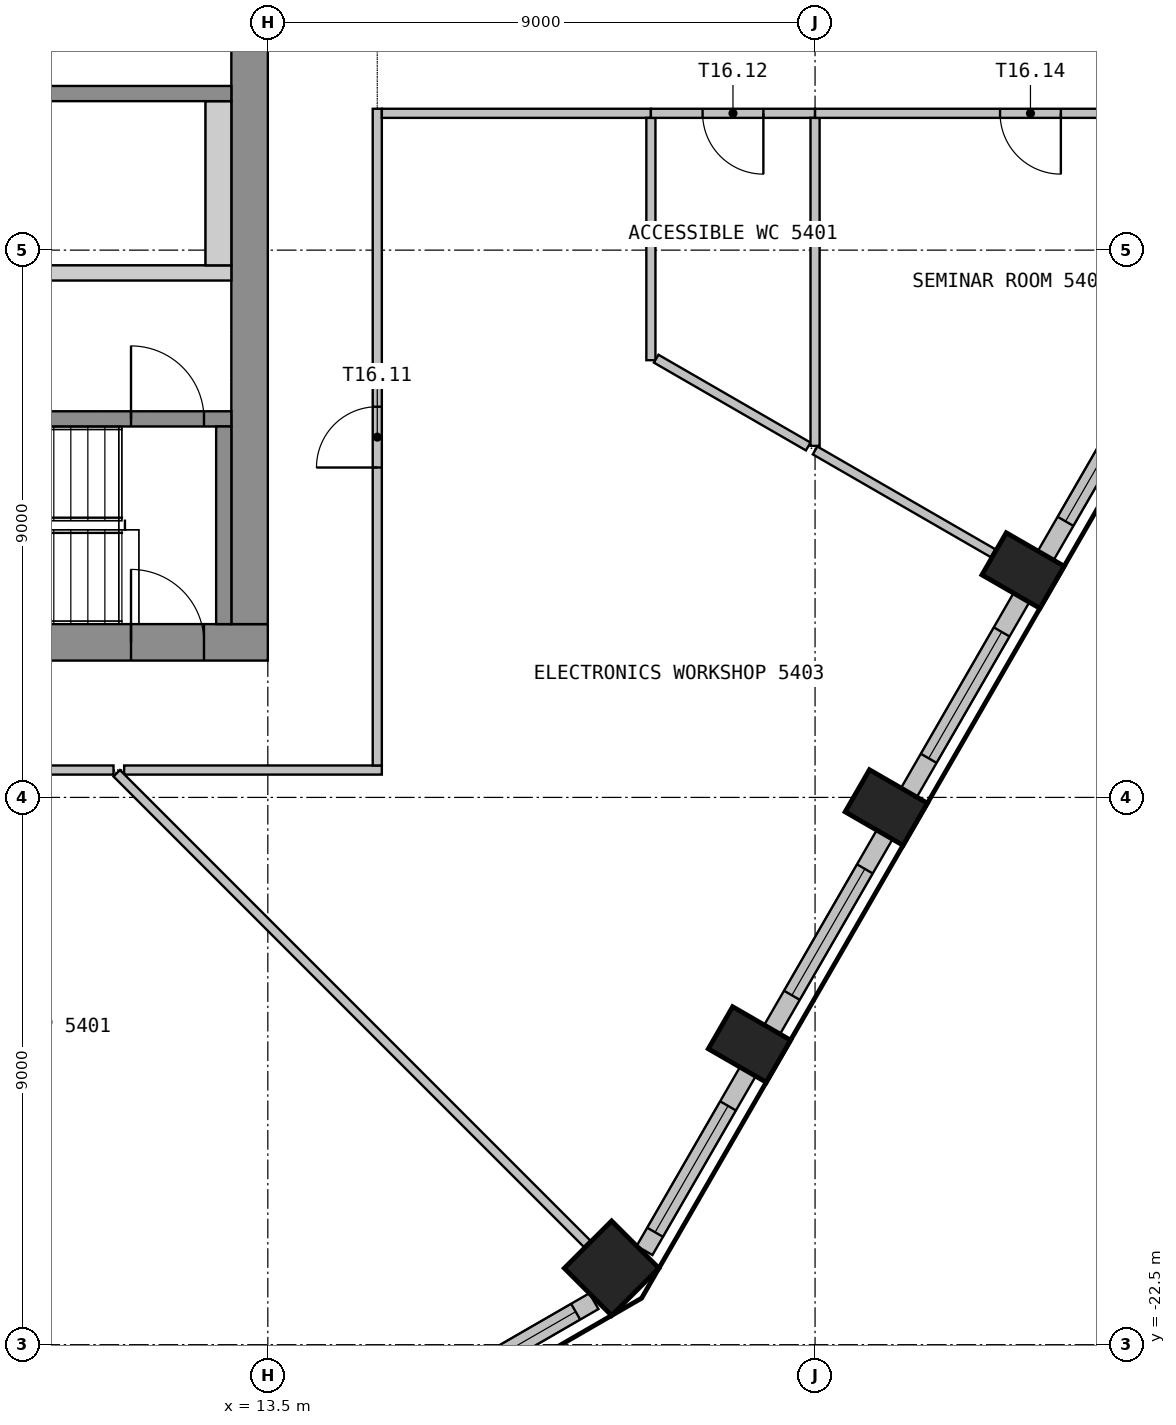
"""IFC4 building model, lengths in metres.
Left out: names, types, materials, properties, quantities, classifications, styles, units other than length and angle.
Written with IfcOpenShell. Run it as: python <this file> out.ifc"""

import sys

from ifc_helpers import new_model, si_unit, direction, frame, frame_2d, origin, origin_2d, place, context, subcontext, project, spatial, polyline, rectangle, outline, extrude, element, fill, save


model = new_model("IFC4")
c1 = context("Model", 3, precision=1e-05, world=origin(), true_north=direction((0.0, 1.0)))
c2 = subcontext(c1, "Body", "Model", "MODEL_VIEW")
j1 = project(units=[si_unit("LENGTHUNIT", "METRE"), si_unit("PLANEANGLEUNIT", "RADIAN")], contexts=[c1])
p1 = place(None, origin())
s1 = spatial("IfcSite", under=j1, at=p1, CompositionType="ELEMENT")
p2 = place(p1, origin())
s2 = spatial("IfcBuilding", under=s1, at=p2, CompositionType="ELEMENT")
p3 = place(p2, frame((0.0, 0.0, 219.0)))
s3 = spatial("IfcBuildingStorey", under=s2, at=p3, CompositionType="ELEMENT", Elevation=219.0)
p4 = place(p3, frame((19.154, -21.242, 0.0), z_axis=(0.0, 0.0, 1.0), x_axis=(0.707106781187, 0.707106781187, 0.0)))
e1 = element("IfcColumn", 1, at=p4, inside=s3, PredefinedType="COLUMN", context=c2, shape_type="SweptSolid", body=[
    extrude(rectangle(XDim=1.1, YDim=1.1, at=origin_2d()), origin(), (0.0, 0.0, 1.0), 3.55),
])
for number, where, z_axis, x_axis in (
    (2, (21.421, -17.563, 0.0), (0.0, 0.0, 1.0), (0.5, 0.866, 0.0)),
    (3, (23.671, -13.666, 0.0), (0.0, 0.0, 1.0), (0.5, 0.866, 0.0)),
    (4, (25.921, -9.769, 0.0), (0.0, 0.0, 1.0), (0.5, 0.866, 0.0)),
):
    element("IfcColumn", number, at=place(p3, frame(where, z_axis=z_axis, x_axis=x_axis)), inside=s3, PredefinedType="COLUMN", context=c2, shape_type="SweptSolid", body=[
        extrude(rectangle(XDim=0.8, YDim=1.1, at=origin_2d()), origin(), (0.0, 0.0, 1.0), 3.55),
    ])
p5 = place(p3, frame((16.184, -23.331, 0.0), z_axis=(0.0, 0.0, 1.0), x_axis=(0.865994975416, 0.500052699777, 0.0)))
e5 = element("IfcWall", 5, at=p5, inside=s3, PredefinedType="SOLIDWALL", context=c2, shape_type="SweptSolid", body=[
    extrude(rectangle(XDim=3.093, YDim=0.3, at=frame_2d((1.546, 0.0))), origin(), (0.0, 0.0, 1.0), 3.55),
])
p6 = place(p5, frame((0.346, 0.0, 0.9)))
e6 = element("IfcOpeningElement", 6, at=p6, cuts=e5, PredefinedType="OPENING", context=c2, shape_type="SweptSolid", body=[
    extrude(rectangle(XDim=2.4, YDim=2.1, at=frame_2d((1.2, 1.05))), frame((0.0, 0.16, 0.0), z_axis=(0.0, -1.0, 0.0), x_axis=(1.0, 0.0, 0.0)), (0.0, 0.0, 1.0), 0.32),
])
p7 = place(p3, frame((19.696, -20.951, 0.0), z_axis=(0.0, 0.0, 1.0), x_axis=(0.500012868213, 0.866017974191, 0.0)))
e7 = element("IfcWall", 7, at=p7, inside=s3, PredefinedType="SOLIDWALL", context=c2, shape_type="SweptSolid", body=[
    extrude(rectangle(XDim=3.396, YDim=0.3, at=frame_2d((1.698, 0.0))), origin(), (0.0, 0.0, 1.0), 3.55),
])
p8 = place(p7, frame((0.346, 0.0, 0.9)))
e8 = element("IfcOpeningElement", 8, at=p8, cuts=e7, PredefinedType="OPENING", context=c2, shape_type="SweptSolid", body=[
    extrude(rectangle(XDim=2.4, YDim=2.1, at=frame_2d((1.2, 1.05))), frame((0.0, 0.16, 0.0), z_axis=(0.0, -1.0, 0.0), x_axis=(1.0, 0.0, 0.0)), (0.0, 0.0, 1.0), 0.32),
])
p9 = place(p3, frame((21.794, -17.317, 0.0), z_axis=(0.0, 0.0, 1.0), x_axis=(0.500029062817, 0.866008623709, 0.0)))
e9 = element("IfcWall", 9, at=p9, inside=s3, PredefinedType="SOLIDWALL", context=c2, shape_type="SweptSolid", body=[
    extrude(rectangle(XDim=3.699, YDim=0.3, at=frame_2d((1.85, 0.0))), origin(), (0.0, 0.0, 1.0), 3.55),
])
p10 = place(p9, frame((0.649, 0.0, 0.9)))
e10 = element("IfcOpeningElement", 10, at=p10, cuts=e9, PredefinedType="OPENING", context=c2, shape_type="SweptSolid", body=[
    extrude(rectangle(XDim=2.4, YDim=2.1, at=frame_2d((1.2, 1.05))), frame((0.0, 0.16, 0.0), z_axis=(0.0, -1.0, 0.0), x_axis=(1.0, 0.0, 0.0)), (0.0, 0.0, 1.0), 0.32),
])
p11 = place(p3, frame((24.044, -13.419, 0.0), z_axis=(0.0, 0.0, 1.0), x_axis=(0.500029062817, 0.866008623709, 0.0)))
e11 = element("IfcWall", 11, at=p11, inside=s3, PredefinedType="SOLIDWALL", context=c2, shape_type="SweptSolid", body=[
    extrude(rectangle(XDim=3.699, YDim=0.3, at=frame_2d((1.85, 0.0))), origin(), (0.0, 0.0, 1.0), 3.55),
])
p12 = place(p11, frame((0.649, 0.0, 0.9)))
e12 = element("IfcOpeningElement", 12, at=p12, cuts=e11, PredefinedType="OPENING", context=c2, shape_type="SweptSolid", body=[
    extrude(rectangle(XDim=2.4, YDim=2.1, at=frame_2d((1.2, 1.05))), frame((0.0, 0.16, 0.0), z_axis=(0.0, -1.0, 0.0), x_axis=(1.0, 0.0, 0.0)), (0.0, 0.0, 1.0), 0.32),
])
p13 = place(p3, frame((26.294, -9.522, 0.0), z_axis=(0.0, 0.0, 1.0), x_axis=(0.500029062817, 0.866008623709, 0.0)))
e13 = element("IfcWall", 13, at=p13, inside=s3, PredefinedType="SOLIDWALL", context=c2, shape_type="SweptSolid", body=[
    extrude(rectangle(XDim=3.699, YDim=0.3, at=frame_2d((1.85, 0.0))), origin(), (0.0, 0.0, 1.0), 3.55),
])
p14 = place(p13, frame((0.649, 0.0, 0.9)))
e14 = element("IfcOpeningElement", 14, at=p14, cuts=e13, PredefinedType="OPENING", context=c2, shape_type="SweptSolid", body=[
    extrude(rectangle(XDim=2.4, YDim=2.1, at=frame_2d((1.2, 1.05))), frame((0.0, 0.16, 0.0), z_axis=(0.0, -1.0, 0.0), x_axis=(1.0, 0.0, 0.0)), (0.0, 0.0, 1.0), 0.32),
])
p15 = place(p3, frame((-13.5, -10.95, 0.0), z_axis=(0.0, 0.0, 1.0), x_axis=(1.0, 0.0, 0.0)))
e15 = element("IfcWall", 15, at=p15, inside=s3, PredefinedType="SHEAR", context=c2, shape_type="SweptSolid", body=[
    extrude(rectangle(XDim=27.0, YDim=0.6, at=frame_2d((13.5, 0.0))), origin(), (0.0, 0.0, 1.0), 3.55),
])
p16 = place(p15, frame((12.3, 0.0, 0.0)))
e16 = element("IfcOpeningElement", 16, at=p16, cuts=e15, PredefinedType="OPENING", context=c2, shape_type="SweptSolid", body=[
    extrude(rectangle(XDim=2.4, YDim=2.1, at=frame_2d((1.2, 1.05))), frame((0.0, 0.31, 0.0), z_axis=(0.0, -1.0, 0.0), x_axis=(1.0, 0.0, 0.0)), (0.0, 0.0, 1.0), 0.62),
])
p17 = place(p15, frame((1.05, 0.0, 0.0)))
e17 = element("IfcOpeningElement", 17, at=p17, cuts=e15, PredefinedType="OPENING", context=c2, shape_type="SweptSolid", body=[
    extrude(rectangle(XDim=1.2, YDim=2.1, at=frame_2d((0.6, 1.05))), frame((0.0, 0.31, 0.0), z_axis=(0.0, -1.0, 0.0), x_axis=(1.0, 0.0, 0.0)), (0.0, 0.0, 1.0), 0.62),
])
p18 = place(p15, frame((24.75, 0.0, 0.0)))
e18 = element("IfcOpeningElement", 18, at=p18, cuts=e15, PredefinedType="OPENING", context=c2, shape_type="SweptSolid", body=[
    extrude(rectangle(XDim=1.2, YDim=2.1, at=frame_2d((0.6, 1.05))), frame((0.0, 0.31, 0.0), z_axis=(0.0, -1.0, 0.0), x_axis=(1.0, 0.0, 0.0)), (0.0, 0.0, 1.0), 0.62),
])
p19 = place(p3, frame((13.2, -10.65, 0.0), z_axis=(0.0, 0.0, 1.0), x_axis=(0.0, 1.0, 0.0)))
e19 = element("IfcWall", 19, at=p19, inside=s3, PredefinedType="SHEAR", context=c2, shape_type="SweptSolid", body=[
    extrude(rectangle(XDim=21.3, YDim=0.6, at=frame_2d((10.65, 0.0))), origin(), (0.0, 0.0, 1.0), 3.55),
])
p20 = place(p19, frame((9.45, 0.0, 0.0)))
e20 = element("IfcOpeningElement", 20, at=p20, cuts=e19, PredefinedType="OPENING", context=c2, shape_type="SweptSolid", body=[
    extrude(rectangle(XDim=2.4, YDim=2.1, at=frame_2d((1.2, 1.05))), frame((0.0, 0.31, 0.0), z_axis=(0.0, -1.0, 0.0), x_axis=(1.0, 0.0, 0.0)), (0.0, 0.0, 1.0), 0.62),
])
p21 = place(p3, origin())
e21 = element("IfcWall", 21, at=p21, inside=s3, PredefinedType="SHEAR", context=c2, shape_type="SweptSolid", body=[
    extrude(outline(polyline([(-1.525, -5.0), (12.9, -5.0), (12.9, -4.75), (-1.525, -4.75), (-1.525, -5.0)])), origin(), (0.0, 0.0, 1.0), 3.55),
])
p22 = place(p3, origin())
e22 = element("IfcWall", 22, at=p22, inside=s3, PredefinedType="SHEAR", context=c2, shape_type="SweptSolid", body=[
    extrude(outline(polyline([(12.475, -4.75), (12.9, -4.75), (12.9, -2.05), (12.475, -2.05), (12.475, -4.75)])), origin(), (0.0, 0.0, 1.0), 3.55),
])
p23 = place(p3, frame((-1.525, -1.925, 0.0), z_axis=(0.0, 0.0, 1.0), x_axis=(1.0, 0.0, 0.0)))
e23 = element("IfcWall", 23, at=p23, inside=s3, PredefinedType="SHEAR", context=c2, shape_type="SweptSolid", body=[
    extrude(rectangle(XDim=14.425, YDim=0.25, at=frame_2d((7.212, 0.0))), origin(), (0.0, 0.0, 1.0), 3.55),
])
p24 = place(p23, frame((0.925, 0.0, 0.0)))
e24 = element("IfcOpeningElement", 24, at=p24, cuts=e23, PredefinedType="OPENING", context=c2, shape_type="SweptSolid", body=[
    extrude(rectangle(XDim=1.2, YDim=2.1, at=frame_2d((0.6, 1.05))), frame((0.0, 0.135, 0.0), z_axis=(0.0, -1.0, 0.0), x_axis=(1.0, 0.0, 0.0)), (0.0, 0.0, 1.0), 0.27),
])
p25 = place(p23, frame((3.725, 0.0, 0.0)))
e25 = element("IfcOpeningElement", 25, at=p25, cuts=e23, PredefinedType="OPENING", context=c2, shape_type="SweptSolid", body=[
    extrude(rectangle(XDim=1.2, YDim=2.1, at=frame_2d((0.6, 1.05))), frame((0.0, 0.135, 0.0), z_axis=(0.0, -1.0, 0.0), x_axis=(1.0, 0.0, 0.0)), (0.0, 0.0, 1.0), 0.27),
])
p26 = place(p3, frame((2.8, -7.275, 0.0), z_axis=(0.0, 0.0, 1.0), x_axis=(1.0, 0.0, 0.0)))
e26 = element("IfcWall", 26, at=p26, inside=s3, PredefinedType="SHEAR", context=c2, shape_type="SweptSolid", body=[
    extrude(rectangle(XDim=10.1, YDim=0.25, at=frame_2d((5.05, 0.0))), origin(), (0.0, 0.0, 1.0), 3.55),
])
p27 = place(p26, frame((8.45, 0.0, 0.0)))
e27 = element("IfcOpeningElement", 27, at=p27, cuts=e26, PredefinedType="OPENING", context=c2, shape_type="SweptSolid", body=[
    extrude(rectangle(XDim=1.2, YDim=2.1, at=frame_2d((0.6, 1.05))), frame((0.0, 0.135, 0.0), z_axis=(0.0, -1.0, 0.0), x_axis=(1.0, 0.0, 0.0)), (0.0, 0.0, 1.0), 0.27),
])
p28 = place(p3, frame((12.775, -10.65, 0.0), z_axis=(0.0, 0.0, 1.0), x_axis=(0.0, 1.0, 0.0)))
e28 = element("IfcWall", 28, at=p28, inside=s3, PredefinedType="SHEAR", context=c2, shape_type="SweptSolid", body=[
    extrude(rectangle(XDim=3.25, YDim=0.25, at=frame_2d((1.625, 0.0))), origin(), (0.0, 0.0, 1.0), 3.55),
])
p29 = place(p3, frame((2.25, -13.05, 0.0), z_axis=(0.0, 0.0, 1.0), x_axis=(1.0, 0.0, 0.0)))
e29 = element("IfcWall", 29, at=p29, inside=s3, PredefinedType="PARTITIONING", context=c2, shape_type="SweptSolid", body=[
    extrude(rectangle(XDim=8.712, YDim=0.15, at=frame_2d((4.356, 0.0))), origin(), (0.0, 0.0, 1.0), 3.55),
])
p30 = place(p29, frame((3.856, 0.0, 0.0)))
e30 = element("IfcOpeningElement", 30, at=p30, cuts=e29, PredefinedType="OPENING", context=c2, shape_type="SweptSolid", body=[
    extrude(rectangle(XDim=1.0, YDim=2.1, at=frame_2d((0.5, 1.05))), frame((0.0, 0.085, 0.0), z_axis=(0.0, -1.0, 0.0), x_axis=(1.0, 0.0, 0.0)), (0.0, 0.0, 1.0), 0.17),
])
p31 = place(p3, frame((11.137, -13.05, 0.0), z_axis=(0.0, 0.0, 1.0), x_axis=(1.0, 0.0, 0.0)))
e31 = element("IfcWall", 31, at=p31, inside=s3, PredefinedType="PARTITIONING", context=c2, shape_type="SweptSolid", body=[
    extrude(rectangle(XDim=4.238, YDim=0.15, at=frame_2d((2.119, 0.0))), origin(), (0.0, 0.0, 1.0), 3.55),
])
p32 = place(p3, frame((11.015, -13.103, 0.0), z_axis=(0.0, 0.0, 1.0), x_axis=(0.707073307884, -0.707140252905, 0.0)))
e32 = element("IfcWall", 32, at=p32, inside=s3, PredefinedType="PARTITIONING", context=c2, shape_type="SweptSolid", body=[
    extrude(rectangle(XDim=10.941, YDim=0.15, at=frame_2d((5.47, 0.0))), origin(), (0.0, 0.0, 1.0), 3.55),
])
p33 = place(p3, frame((15.3, -12.975, 0.0), z_axis=(0.0, 0.0, 1.0), x_axis=(0.0, 1.0, 0.0)))
e33 = element("IfcWall", 33, at=p33, inside=s3, PredefinedType="PARTITIONING", context=c2, shape_type="SweptSolid", body=[
    extrude(rectangle(XDim=10.8, YDim=0.15, at=frame_2d((5.4, 0.0))), origin(), (0.0, 0.0, 1.0), 3.55),
])
p34 = place(p33, frame((4.9, 0.0, 0.0)))
e34 = element("IfcOpeningElement", 34, at=p34, cuts=e33, PredefinedType="OPENING", context=c2, shape_type="SweptSolid", body=[
    extrude(rectangle(XDim=1.0, YDim=2.1, at=frame_2d((0.5, 1.05))), frame((0.0, 0.085, 0.0), z_axis=(0.0, -1.0, 0.0), x_axis=(1.0, 0.0, 0.0)), (0.0, 0.0, 1.0), 0.17),
])
p35 = place(p3, frame((19.8, -2.25, 0.0), z_axis=(0.0, 0.0, 1.0), x_axis=(-1.0, 0.0, 0.0)))
e35 = element("IfcWall", 35, at=p35, inside=s3, PredefinedType="PARTITIONING", context=c2, shape_type="SweptSolid", body=[
    extrude(rectangle(XDim=4.425, YDim=0.15, at=frame_2d((2.212, 0.0))), origin(), (0.0, 0.0, 1.0), 3.55),
])
p36 = place(p3, frame((19.8, -2.325, 0.0), z_axis=(0.0, 0.0, 1.0), x_axis=(0.0, -1.0, 0.0)))
e36 = element("IfcWall", 36, at=p36, inside=s3, PredefinedType="PARTITIONING", context=c2, shape_type="SweptSolid", body=[
    extrude(rectangle(XDim=3.985, YDim=0.15, at=frame_2d((1.993, 0.0))), origin(), (0.0, 0.0, 1.0), 3.55),
])
p37 = place(p3, frame((19.887, -6.285, 0.0), z_axis=(0.0, 0.0, 1.0), x_axis=(0.865981426562, -0.500076163049, 0.0)))
e37 = element("IfcWall", 37, at=p37, inside=s3, PredefinedType="PARTITIONING", context=c2, shape_type="SweptSolid", body=[
    extrude(rectangle(XDim=2.888, YDim=0.15, at=frame_2d((1.444, 0.0))), origin(), (0.0, 0.0, 1.0), 3.55),
])
p38 = place(p3, frame((22.5, -2.25, 0.0), z_axis=(0.0, 0.0, 1.0), x_axis=(-1.0, 0.0, 0.0)))
e38 = element("IfcWall", 38, at=p38, inside=s3, PredefinedType="PARTITIONING", context=c2, shape_type="SweptSolid", body=[
    extrude(rectangle(XDim=2.7, YDim=0.15, at=frame_2d((1.35, 0.0))), origin(), (0.0, 0.0, 1.0), 3.55),
])
p39 = place(p38, frame((0.85, 0.0, 0.0)))
e39 = element("IfcOpeningElement", 39, at=p39, cuts=e38, PredefinedType="OPENING", context=c2, shape_type="SweptSolid", body=[
    extrude(rectangle(XDim=1.0, YDim=2.1, at=frame_2d((0.5, 1.05))), frame((0.0, 0.085, 0.0), z_axis=(0.0, -1.0, 0.0), x_axis=(1.0, 0.0, 0.0)), (0.0, 0.0, 1.0), 0.17),
])
p40 = place(p3, frame((22.5, -2.325, 0.0), z_axis=(0.0, 0.0, 1.0), x_axis=(0.0, -1.0, 0.0)))
e40 = element("IfcWall", 40, at=p40, inside=s3, PredefinedType="PARTITIONING", context=c2, shape_type="SweptSolid", body=[
    extrude(rectangle(XDim=5.394, YDim=0.15, at=frame_2d((2.697, 0.0))), origin(), (0.0, 0.0, 1.0), 3.55),
])
p41 = place(p3, frame((22.5, -7.794, 0.0), z_axis=(0.0, 0.0, 1.0), x_axis=(0.866007567725, -0.50003089169, 0.0)))
e41 = element("IfcWall", 41, at=p41, inside=s3, PredefinedType="PARTITIONING", context=c2, shape_type="SweptSolid", body=[
    extrude(rectangle(XDim=3.38, YDim=0.15, at=frame_2d((1.69, 0.0))), origin(), (0.0, 0.0, 1.0), 3.55),
])
p42 = place(p3, frame((29.585, -2.25, 0.0), z_axis=(0.0, 0.0, 1.0), x_axis=(-1.0, 0.0, 0.0)))
e42 = element("IfcWall", 42, at=p42, inside=s3, PredefinedType="PARTITIONING", context=c2, shape_type="SweptSolid", body=[
    extrude(rectangle(XDim=7.085, YDim=0.15, at=frame_2d((3.542, 0.0))), origin(), (0.0, 0.0, 1.0), 3.55),
])
p43 = place(p42, frame((3.042, 0.0, 0.0)))
e43 = element("IfcOpeningElement", 43, at=p43, cuts=e42, PredefinedType="OPENING", context=c2, shape_type="SweptSolid", body=[
    extrude(rectangle(XDim=1.0, YDim=2.1, at=frame_2d((0.5, 1.05))), frame((0.0, 0.085, 0.0), z_axis=(0.0, -1.0, 0.0), x_axis=(1.0, 0.0, 0.0)), (0.0, 0.0, 1.0), 0.17),
])
p44 = place(p6, origin())
e44 = element("IfcWindow", 44, at=p44, inside=s3, PartitioningType="SINGLE_PANEL", PredefinedType="WINDOW", context=c2, shape_type="SweptSolid", body=[
    extrude(rectangle(XDim=2.4, YDim=2.1, at=frame_2d((1.2, 1.05))), frame((0.0, 0.03, 0.0), z_axis=(0.0, -1.0, 0.0), x_axis=(1.0, 0.0, 0.0)), (0.0, 0.0, 1.0), 0.06),
])
fill(e6, e44)
p45 = place(p8, origin())
e45 = element("IfcWindow", 45, at=p45, inside=s3, PartitioningType="SINGLE_PANEL", PredefinedType="WINDOW", context=c2, shape_type="SweptSolid", body=[
    extrude(rectangle(XDim=2.4, YDim=2.1, at=frame_2d((1.2, 1.05))), frame((0.0, 0.03, 0.0), z_axis=(0.0, -1.0, 0.0), x_axis=(1.0, 0.0, 0.0)), (0.0, 0.0, 1.0), 0.06),
])
fill(e8, e45)
p46 = place(p10, origin())
e46 = element("IfcWindow", 46, at=p46, inside=s3, PartitioningType="SINGLE_PANEL", PredefinedType="WINDOW", context=c2, shape_type="SweptSolid", body=[
    extrude(rectangle(XDim=2.4, YDim=2.1, at=frame_2d((1.2, 1.05))), frame((0.0, 0.03, 0.0), z_axis=(0.0, -1.0, 0.0), x_axis=(1.0, 0.0, 0.0)), (0.0, 0.0, 1.0), 0.06),
])
fill(e10, e46)
p47 = place(p12, origin())
e47 = element("IfcWindow", 47, at=p47, inside=s3, PartitioningType="SINGLE_PANEL", PredefinedType="WINDOW", context=c2, shape_type="SweptSolid", body=[
    extrude(rectangle(XDim=2.4, YDim=2.1, at=frame_2d((1.2, 1.05))), frame((0.0, 0.03, 0.0), z_axis=(0.0, -1.0, 0.0), x_axis=(1.0, 0.0, 0.0)), (0.0, 0.0, 1.0), 0.06),
])
fill(e12, e47)
p48 = place(p14, origin())
e48 = element("IfcWindow", 48, at=p48, inside=s3, PartitioningType="SINGLE_PANEL", PredefinedType="WINDOW", context=c2, shape_type="SweptSolid", body=[
    extrude(rectangle(XDim=2.4, YDim=2.1, at=frame_2d((1.2, 1.05))), frame((0.0, 0.03, 0.0), z_axis=(0.0, -1.0, 0.0), x_axis=(1.0, 0.0, 0.0)), (0.0, 0.0, 1.0), 0.06),
])
fill(e14, e48)
p49 = place(p18, origin())
e49 = element("IfcDoor", 49, at=p49, inside=s3, OperationType="SINGLE_SWING_RIGHT", PredefinedType="DOOR", context=c2, shape_type="SweptSolid", body=[
    extrude(rectangle(XDim=1.2, YDim=2.1, at=frame_2d((0.6, 1.05))), frame((0.0, 0.025, 0.0), z_axis=(0.0, -1.0, 0.0), x_axis=(1.0, 0.0, 0.0)), (0.0, 0.0, 1.0), 0.05),
])
fill(e18, e49)
p50 = place(p27, origin())
e50 = element("IfcDoor", 50, at=p50, inside=s3, OperationType="SINGLE_SWING_LEFT", PredefinedType="DOOR", context=c2, shape_type="SweptSolid", body=[
    extrude(rectangle(XDim=1.2, YDim=2.1, at=frame_2d((0.6, 1.05))), frame((0.0, 0.025, 0.0), z_axis=(0.0, -1.0, 0.0), x_axis=(1.0, 0.0, 0.0)), (0.0, 0.0, 1.0), 0.05),
])
fill(e27, e50)
p51 = place(p34, origin())
e51 = element("IfcDoor", 51, at=p51, inside=s3, OperationType="SINGLE_SWING_RIGHT", PredefinedType="DOOR", context=c2, shape_type="SweptSolid", body=[
    extrude(rectangle(XDim=1.0, YDim=2.1, at=frame_2d((0.5, 1.05))), frame((0.0, 0.025, 0.0), z_axis=(0.0, -1.0, 0.0), x_axis=(1.0, 0.0, 0.0)), (0.0, 0.0, 1.0), 0.05),
])
fill(e34, e51)
p52 = place(p39, origin())
e52 = element("IfcDoor", 52, at=p52, inside=s3, OperationType="SINGLE_SWING_LEFT", PredefinedType="DOOR", context=c2, shape_type="SweptSolid", body=[
    extrude(rectangle(XDim=1.0, YDim=2.1, at=frame_2d((0.5, 1.05))), frame((0.0, 0.025, 0.0), z_axis=(0.0, -1.0, 0.0), x_axis=(1.0, 0.0, 0.0)), (0.0, 0.0, 1.0), 0.05),
])
fill(e39, e52)
p53 = place(p43, origin())
e53 = element("IfcDoor", 53, at=p53, inside=s3, OperationType="SINGLE_SWING_LEFT", PredefinedType="DOOR", context=c2, shape_type="SweptSolid", body=[
    extrude(rectangle(XDim=1.0, YDim=2.1, at=frame_2d((0.5, 1.05))), frame((0.0, 0.025, 0.0), z_axis=(0.0, -1.0, 0.0), x_axis=(1.0, 0.0, 0.0)), (0.0, 0.0, 1.0), 0.05),
])
fill(e43, e53)
save(model, sys.argv[1])
